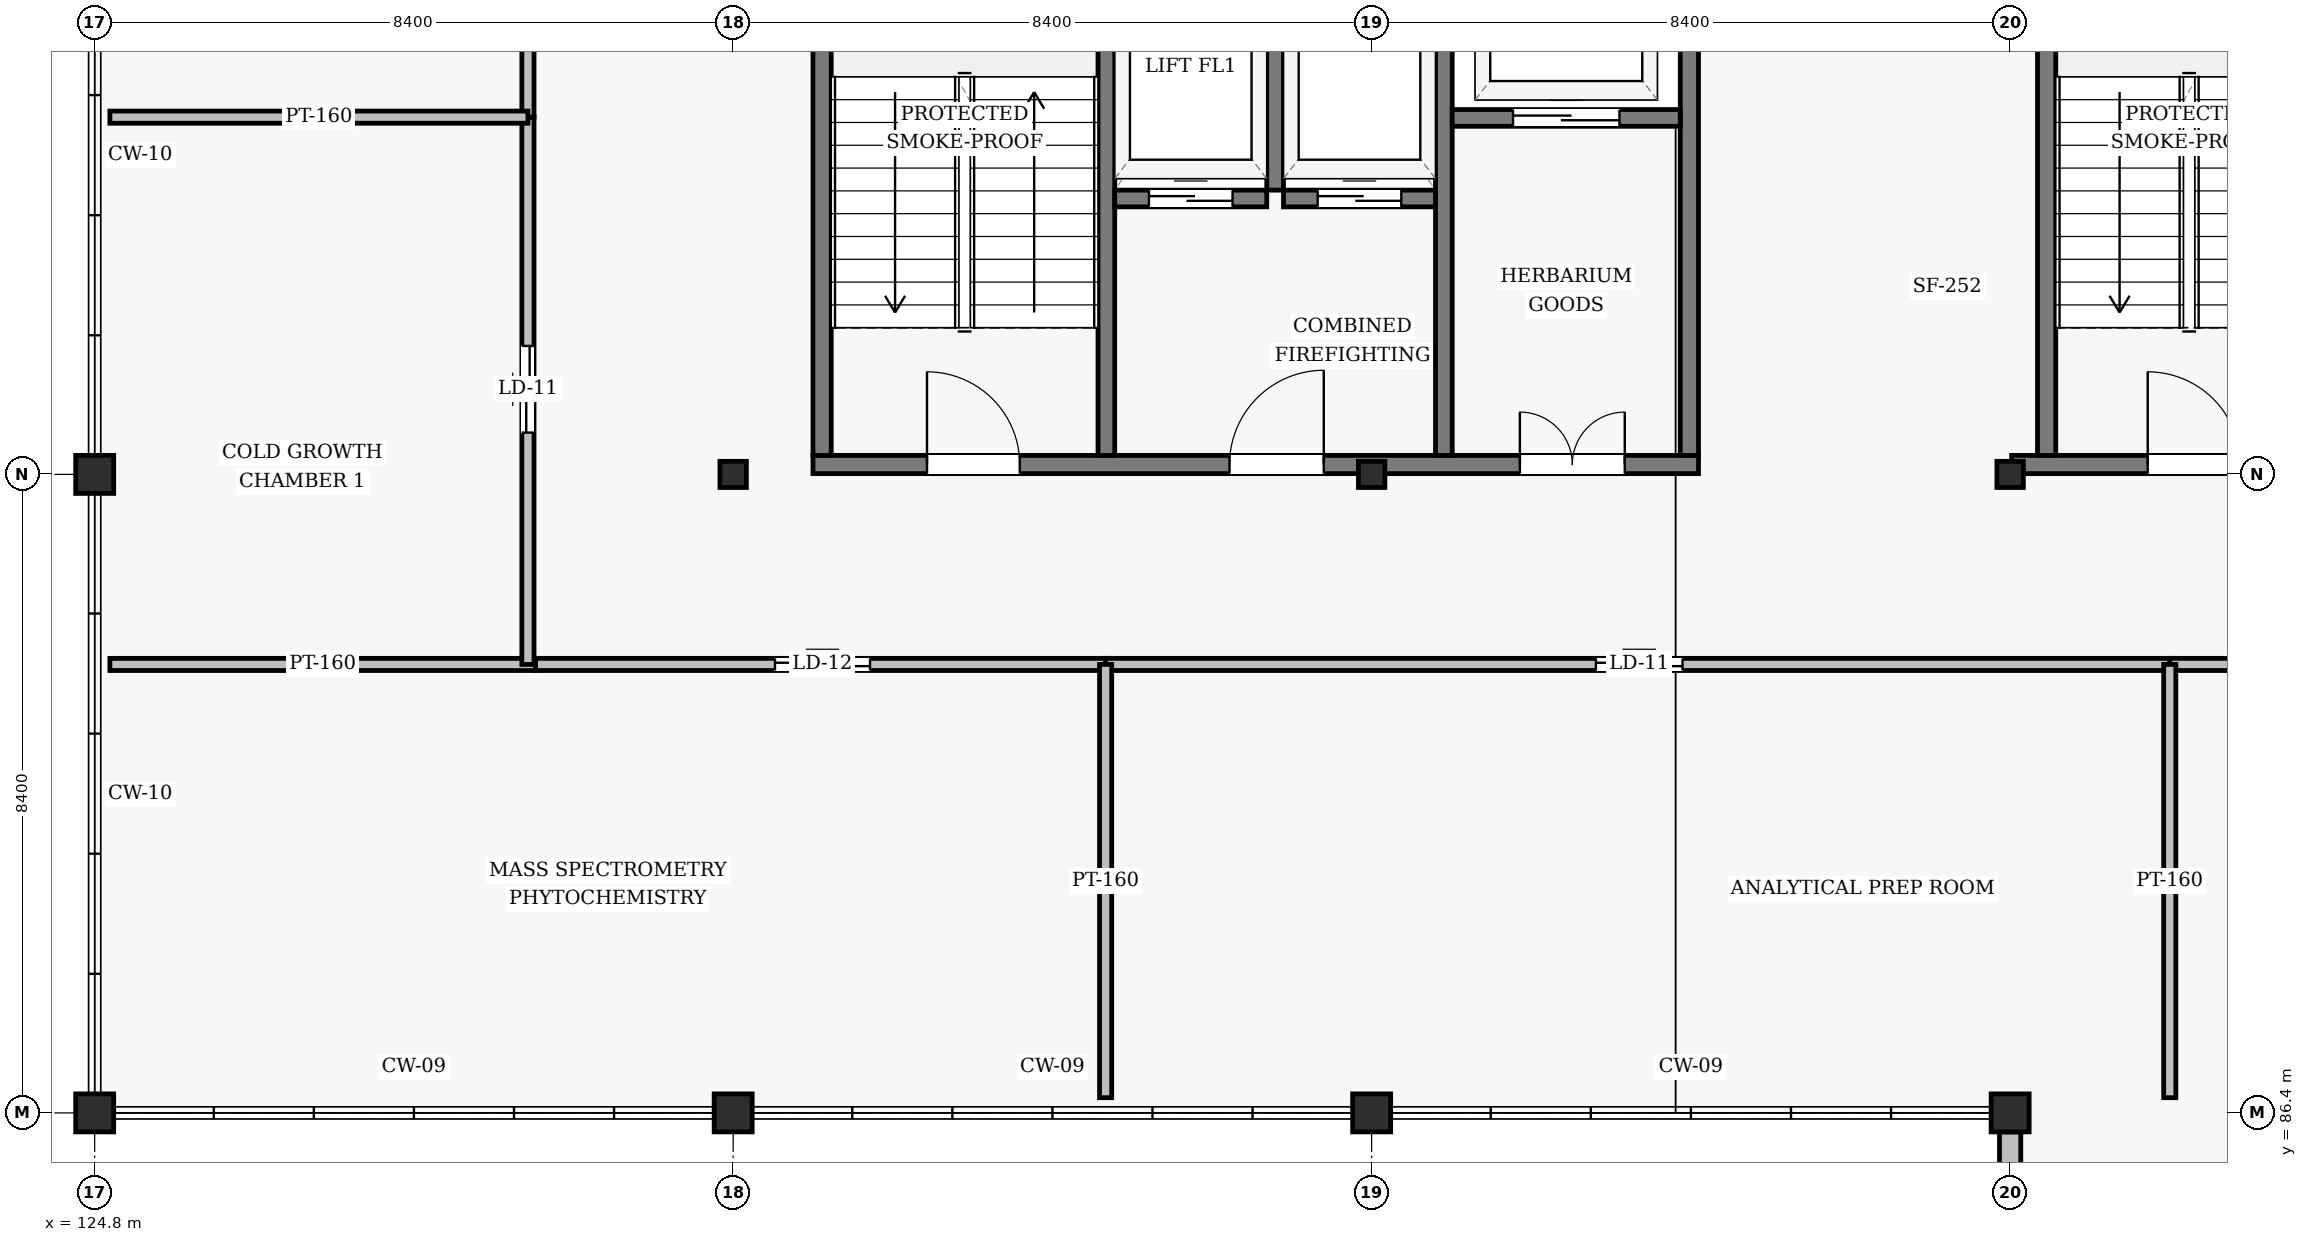
"""IFC4 building model, lengths in metres.
Left out: names, types, materials, properties, quantities, classifications, styles, units other than length and angle.
Written with IfcOpenShell. Run it as: python <this file> out.ifc"""

import sys

from ifc_helpers import new_model, si_unit, direction, frame, frame_2d, origin, origin_2d, place, context, subcontext, project, spatial, rectangle, hollow_rectangle, i_section, extrude, element, fill, save


model = new_model("IFC4")
c1 = context("Model", 3, precision=1e-05, world=origin(), true_north=direction((0.0, 1.0)))
c2 = subcontext(c1, "Body", "Model", "MODEL_VIEW")
j1 = project(units=[si_unit("LENGTHUNIT", "METRE"), si_unit("PLANEANGLEUNIT", "RADIAN")], contexts=[c1])
p1 = place(None, origin())
s1 = spatial("IfcSite", under=j1, at=p1, CompositionType="ELEMENT")
p2 = place(p1, origin())
s2 = spatial("IfcBuilding", under=s1, at=p2, CompositionType="ELEMENT")
p3 = place(p2, frame((0.0, 0.0, 39.6)))
s3 = spatial("IfcBuildingStorey", under=s2, at=p3, CompositionType="ELEMENT", Elevation=39.6)
for number, where, z_axis, x_axis in (
    (1, (124.8, 86.4, 0.0), (0.0, 0.0, 1.0), (1.0, 0.0, 0.0)),
    (2, (124.8, 94.8, 0.0), (0.0, 0.0, 1.0), (1.0, 0.0, 0.0)),
    (3, (133.2, 86.4, 0.0), (0.0, 0.0, 1.0), (1.0, 0.0, 0.0)),
):
    element("IfcColumn", number, at=place(p3, frame(where, z_axis=z_axis, x_axis=x_axis)), inside=s3, PredefinedType="COLUMN", context=c2, shape_type="SweptSolid", body=[
        extrude(hollow_rectangle(XDim=0.5, YDim=0.5, WallThickness=0.02, InnerFilletRadius=0.02, OuterFilletRadius=0.04, at=origin_2d()), origin(), (0.0, 0.0, 1.0), 3.6),
    ])
p4 = place(p3, frame((133.2, 94.8, 0.0), z_axis=(0.0, 0.0, 1.0), x_axis=(1.0, 0.0, 0.0)))
e4 = element("IfcColumn", 4, at=p4, inside=s3, PredefinedType="COLUMN", context=c2, shape_type="SweptSolid", body=[
    extrude(i_section(OverallWidth=0.348, OverallDepth=0.344, WebThickness=0.01, FlangeThickness=0.016, FilletRadius=0.02, at=origin_2d()), origin(), (0.0, 0.0, 1.0), 3.6),
])
p5 = place(p3, frame((141.6, 86.4, 0.0), z_axis=(0.0, 0.0, 1.0), x_axis=(1.0, 0.0, 0.0)))
e5 = element("IfcColumn", 5, at=p5, inside=s3, PredefinedType="COLUMN", context=c2, shape_type="SweptSolid", body=[
    extrude(hollow_rectangle(XDim=0.5, YDim=0.5, WallThickness=0.02, InnerFilletRadius=0.02, OuterFilletRadius=0.04, at=origin_2d()), origin(), (0.0, 0.0, 1.0), 3.6),
])
p6 = place(p3, frame((141.6, 94.8, 0.0), z_axis=(0.0, 0.0, 1.0), x_axis=(1.0, 0.0, 0.0)))
e6 = element("IfcColumn", 6, at=p6, inside=s3, PredefinedType="COLUMN", context=c2, shape_type="SweptSolid", body=[
    extrude(i_section(OverallWidth=0.348, OverallDepth=0.344, WebThickness=0.01, FlangeThickness=0.016, FilletRadius=0.02, at=origin_2d()), origin(), (0.0, 0.0, 1.0), 3.6),
])
p7 = place(p3, frame((150.0, 86.4, 0.0), z_axis=(0.0, 0.0, 1.0), x_axis=(1.0, 0.0, 0.0)))
e7 = element("IfcColumn", 7, at=p7, inside=s3, PredefinedType="COLUMN", context=c2, shape_type="SweptSolid", body=[
    extrude(hollow_rectangle(XDim=0.5, YDim=0.5, WallThickness=0.02, InnerFilletRadius=0.02, OuterFilletRadius=0.04, at=origin_2d()), origin(), (0.0, 0.0, 1.0), 3.6),
])
p8 = place(p3, frame((150.0, 94.8, 0.0), z_axis=(0.0, 0.0, 1.0), x_axis=(1.0, 0.0, 0.0)))
e8 = element("IfcColumn", 8, at=p8, inside=s3, PredefinedType="COLUMN", context=c2, shape_type="SweptSolid", body=[
    extrude(i_section(OverallWidth=0.348, OverallDepth=0.344, WebThickness=0.01, FlangeThickness=0.016, FilletRadius=0.02, at=origin_2d()), origin(), (0.0, 0.0, 1.0), 3.6),
])
p9 = place(p3, frame((150.0, 86.15, 0.0), z_axis=(0.0, 0.0, 1.0), x_axis=(0.0, -1.0, 0.0)))
e9 = element("IfcWall", 9, at=p9, inside=s3, PredefinedType="SOLIDWALL", context=c2, shape_type="SweptSolid", body=[
    extrude(rectangle(XDim=3.825, YDim=0.28, at=frame_2d((1.913, 0.0))), origin(), (0.0, 0.0, 1.0), 2.848),
])
p10 = place(p3, frame((134.25, 94.93, 0.0), z_axis=(0.0, 0.0, 1.0), x_axis=(1.0, 0.0, 0.0)))
e10 = element("IfcWall", 10, at=p10, inside=s3, PredefinedType="SHEAR", context=c2, shape_type="SweptSolid", body=[
    extrude(rectangle(XDim=11.65, YDim=0.24, at=frame_2d((5.825, 0.0))), origin(), (0.0, 0.0, 1.0), 3.342),
])
p11 = place(p10, frame((1.5, 0.0, 0.0)))
e11 = element("IfcOpeningElement", 11, at=p11, cuts=e10, PredefinedType="OPENING", context=c2, shape_type="SweptSolid", body=[
    extrude(rectangle(XDim=1.22, YDim=2.18, at=frame_2d((0.61, 1.09))), frame((0.0, 0.13, 0.0), z_axis=(0.0, -1.0, 0.0), x_axis=(1.0, 0.0, 0.0)), (0.0, 0.0, 1.0), 0.26),
])
p12 = place(p10, frame((5.48, 0.0, 0.0)))
e12 = element("IfcOpeningElement", 12, at=p12, cuts=e10, PredefinedType="OPENING", context=c2, shape_type="SweptSolid", body=[
    extrude(rectangle(XDim=1.24, YDim=2.15, at=frame_2d((0.62, 1.075))), frame((0.0, 0.13, 0.0), z_axis=(0.0, -1.0, 0.0), x_axis=(1.0, 0.0, 0.0)), (0.0, 0.0, 1.0), 0.26),
])
p13 = place(p10, frame((9.3, 0.0, 0.0)))
e13 = element("IfcOpeningElement", 13, at=p13, cuts=e10, PredefinedType="OPENING", context=c2, shape_type="SweptSolid", body=[
    extrude(rectangle(XDim=1.38, YDim=2.15, at=frame_2d((0.69, 1.075))), frame((0.0, 0.13, 0.0), z_axis=(0.0, -1.0, 0.0), x_axis=(1.0, 0.0, 0.0)), (0.0, 0.0, 1.0), 0.26),
])
p14 = place(p3, frame((134.37, 95.05, 0.0), z_axis=(0.0, 0.0, 1.0), x_axis=(0.0, 1.0, 0.0)))
e14 = element("IfcWall", 14, at=p14, inside=s3, PredefinedType="SHEAR", context=c2, shape_type="SweptSolid", body=[
    extrude(rectangle(XDim=7.9, YDim=0.24, at=frame_2d((3.95, 0.0))), origin(), (0.0, 0.0, 1.0), 3.342),
])
p15 = place(p3, frame((138.11, 95.05, 0.0), z_axis=(0.0, 0.0, 1.0), x_axis=(0.0, 1.0, 0.0)))
e15 = element("IfcWall", 15, at=p15, inside=s3, PredefinedType="SHEAR", context=c2, shape_type="SweptSolid", body=[
    extrude(rectangle(XDim=7.9, YDim=0.22, at=frame_2d((3.95, 0.0))), origin(), (0.0, 0.0, 1.0), 3.342),
])
p16 = place(p3, frame((140.33, 98.54, 0.0), z_axis=(0.0, 0.0, 1.0), x_axis=(0.0, 1.0, 0.0)))
e16 = element("IfcWall", 16, at=p16, inside=s3, PredefinedType="SHEAR", context=c2, shape_type="SweptSolid", body=[
    extrude(rectangle(XDim=4.41, YDim=0.22, at=frame_2d((2.205, 0.0))), origin(), (0.0, 0.0, 1.0), 3.342),
])
p17 = place(p3, frame((142.55, 95.05, 0.0), z_axis=(0.0, 0.0, 1.0), x_axis=(0.0, 1.0, 0.0)))
e17 = element("IfcWall", 17, at=p17, inside=s3, PredefinedType="SHEAR", context=c2, shape_type="SweptSolid", body=[
    extrude(rectangle(XDim=7.9, YDim=0.22, at=frame_2d((3.95, 0.0))), origin(), (0.0, 0.0, 1.0), 3.342),
])
p18 = place(p3, frame((145.78, 95.05, 0.0), z_axis=(0.0, 0.0, 1.0), x_axis=(0.0, 1.0, 0.0)))
e18 = element("IfcWall", 18, at=p18, inside=s3, PredefinedType="SHEAR", context=c2, shape_type="SweptSolid", body=[
    extrude(rectangle(XDim=7.9, YDim=0.24, at=frame_2d((3.95, 0.0))), origin(), (0.0, 0.0, 1.0), 3.342),
])
p19 = place(p3, frame((138.22, 98.43, 0.0), z_axis=(0.0, 0.0, 1.0), x_axis=(1.0, 0.0, 0.0)))
e19 = element("IfcWall", 19, at=p19, inside=s3, PredefinedType="SHEAR", context=c2, shape_type="SweptSolid", body=[
    extrude(rectangle(XDim=2.0, YDim=0.22, at=frame_2d((1.0, 0.0))), origin(), (0.0, 0.0, 1.0), 3.342),
])
p20 = place(p19, frame((0.45, 0.0, 0.0)))
e20 = element("IfcOpeningElement", 20, at=p20, cuts=e19, PredefinedType="OPENING", context=c2, shape_type="SweptSolid", body=[
    extrude(rectangle(XDim=1.1, YDim=2.15, at=frame_2d((0.55, 1.075))), frame((0.0, 0.12, 0.0), z_axis=(0.0, -1.0, 0.0), x_axis=(1.0, 0.0, 0.0)), (0.0, 0.0, 1.0), 0.24),
])
p21 = place(p3, frame((140.44, 98.43, 0.0), z_axis=(0.0, 0.0, 1.0), x_axis=(1.0, 0.0, 0.0)))
e21 = element("IfcWall", 21, at=p21, inside=s3, PredefinedType="SHEAR", context=c2, shape_type="SweptSolid", body=[
    extrude(rectangle(XDim=2.0, YDim=0.22, at=frame_2d((1.0, 0.0))), origin(), (0.0, 0.0, 1.0), 3.342),
])
p22 = place(p21, frame((0.45, 0.0, 0.0)))
e22 = element("IfcOpeningElement", 22, at=p22, cuts=e21, PredefinedType="OPENING", context=c2, shape_type="SweptSolid", body=[
    extrude(rectangle(XDim=1.1, YDim=2.15, at=frame_2d((0.55, 1.075))), frame((0.0, 0.12, 0.0), z_axis=(0.0, -1.0, 0.0), x_axis=(1.0, 0.0, 0.0)), (0.0, 0.0, 1.0), 0.24),
])
p23 = place(p3, frame((142.66, 99.49, 0.0), z_axis=(0.0, 0.0, 1.0), x_axis=(1.0, 0.0, 0.0)))
e23 = element("IfcWall", 23, at=p23, inside=s3, PredefinedType="SHEAR", context=c2, shape_type="SweptSolid", body=[
    extrude(rectangle(XDim=3.0, YDim=0.22, at=frame_2d((1.5, 0.0))), origin(), (0.0, 0.0, 1.0), 3.342),
])
p24 = place(p23, frame((0.8, 0.0, 0.0)))
e24 = element("IfcOpeningElement", 24, at=p24, cuts=e23, PredefinedType="OPENING", context=c2, shape_type="SweptSolid", body=[
    extrude(rectangle(XDim=1.4, YDim=2.2, at=frame_2d((0.7, 1.1))), frame((0.0, 0.12, 0.0), z_axis=(0.0, -1.0, 0.0), x_axis=(1.0, 0.0, 0.0)), (0.0, 0.0, 1.0), 0.24),
])
p25 = place(p3, frame((150.02, 94.93, 0.0), z_axis=(0.0, 0.0, 1.0), x_axis=(1.0, 0.0, 0.0)))
e25 = element("IfcWall", 25, at=p25, inside=s3, PredefinedType="SHEAR", context=c2, shape_type="SweptSolid", body=[
    extrude(rectangle(XDim=8.77, YDim=0.24, at=frame_2d((4.385, 0.0))), origin(), (0.0, 0.0, 1.0), 3.342),
])
p26 = place(p25, frame((1.79, 0.0, 0.0)))
e26 = element("IfcOpeningElement", 26, at=p26, cuts=e25, PredefinedType="OPENING", context=c2, shape_type="SweptSolid", body=[
    extrude(rectangle(XDim=1.22, YDim=2.18, at=frame_2d((0.61, 1.09))), frame((0.0, 0.13, 0.0), z_axis=(0.0, -1.0, 0.0), x_axis=(1.0, 0.0, 0.0)), (0.0, 0.0, 1.0), 0.26),
])
p27 = place(p3, frame((150.48, 95.05, 0.0), z_axis=(0.0, 0.0, 1.0), x_axis=(0.0, 1.0, 0.0)))
e27 = element("IfcWall", 27, at=p27, inside=s3, PredefinedType="SHEAR", context=c2, shape_type="SweptSolid", body=[
    extrude(rectangle(XDim=7.9, YDim=0.24, at=frame_2d((3.95, 0.0))), origin(), (0.0, 0.0, 1.0), 3.342),
])
p28 = place(p3, frame((130.6, 92.3, 0.0), z_axis=(0.0, 0.0, 1.0), x_axis=(1.0, 0.0, 0.0)))
e28 = element("IfcWall", 28, at=p28, inside=s3, PredefinedType="PARTITIONING", context=c2, shape_type="SweptSolid", body=[
    extrude(rectangle(XDim=7.5, YDim=0.16, at=frame_2d((3.75, 0.0))), origin(), (0.0, 0.0, 1.0), 2.842),
])
p29 = place(p28, frame((3.15, 0.0, 0.0)))
e29 = element("IfcOpeningElement", 29, at=p29, cuts=e28, PredefinedType="OPENING", context=c2, shape_type="SweptSolid", body=[
    extrude(rectangle(XDim=1.25, YDim=2.12, at=frame_2d((0.625, 1.06))), frame((0.0, 0.09, 0.0), z_axis=(0.0, -1.0, 0.0), x_axis=(1.0, 0.0, 0.0)), (0.0, 0.0, 1.0), 0.18),
])
p30 = place(p3, frame((138.1, 92.3, 0.0), z_axis=(0.0, 0.0, 1.0), x_axis=(1.0, 0.0, 0.0)))
e30 = element("IfcWall", 30, at=p30, inside=s3, PredefinedType="PARTITIONING", context=c2, shape_type="SweptSolid", body=[
    extrude(rectangle(XDim=14.0, YDim=0.16, at=frame_2d((7.0, 0.0))), origin(), (0.0, 0.0, 1.0), 2.842),
])
p31 = place(p30, frame((6.45, 0.0, 0.0)))
e31 = element("IfcOpeningElement", 31, at=p31, cuts=e30, PredefinedType="OPENING", context=c2, shape_type="SweptSolid", body=[
    extrude(rectangle(XDim=1.14, YDim=2.12, at=frame_2d((0.57, 1.06))), frame((0.0, 0.09, 0.0), z_axis=(0.0, -1.0, 0.0), x_axis=(1.0, 0.0, 0.0)), (0.0, 0.0, 1.0), 0.18),
])
p32 = place(p3, frame((152.1, 92.3, 0.0), z_axis=(0.0, 0.0, 1.0), x_axis=(1.0, 0.0, 0.0)))
e32 = element("IfcWall", 32, at=p32, inside=s3, PredefinedType="PARTITIONING", context=c2, shape_type="SweptSolid", body=[
    extrude(rectangle(XDim=9.3, YDim=0.16, at=frame_2d((4.65, 0.0))), origin(), (0.0, 0.0, 1.0), 2.842),
])
p33 = place(p32, frame((4.05, 0.0, 0.0)))
e33 = element("IfcOpeningElement", 33, at=p33, cuts=e32, PredefinedType="OPENING", context=c2, shape_type="SweptSolid", body=[
    extrude(rectangle(XDim=1.25, YDim=2.12, at=frame_2d((0.625, 1.06))), frame((0.0, 0.09, 0.0), z_axis=(0.0, -1.0, 0.0), x_axis=(1.0, 0.0, 0.0)), (0.0, 0.0, 1.0), 0.18),
])
p34 = place(p3, frame((125.0, 92.3, 0.0), z_axis=(0.0, 0.0, 1.0), x_axis=(1.0, 0.0, 0.0)))
e34 = element("IfcWall", 34, at=p34, inside=s3, PredefinedType="PARTITIONING", context=c2, shape_type="SweptSolid", body=[
    extrude(rectangle(XDim=5.6, YDim=0.16, at=frame_2d((2.8, 0.0))), origin(), (0.0, 0.0, 1.0), 3.342),
])
p35 = place(p3, frame((138.1, 86.6, 0.0), z_axis=(0.0, 0.0, 1.0), x_axis=(0.0, 1.0, 0.0)))
e35 = element("IfcWall", 35, at=p35, inside=s3, PredefinedType="PARTITIONING", context=c2, shape_type="SweptSolid", body=[
    extrude(rectangle(XDim=5.7, YDim=0.16, at=frame_2d((2.85, 0.0))), origin(), (0.0, 0.0, 1.0), 2.992),
])
p36 = place(p3, frame((152.1, 86.6, 0.0), z_axis=(0.0, 0.0, 1.0), x_axis=(0.0, 1.0, 0.0)))
e36 = element("IfcWall", 36, at=p36, inside=s3, PredefinedType="PARTITIONING", context=c2, shape_type="SweptSolid", body=[
    extrude(rectangle(XDim=5.7, YDim=0.16, at=frame_2d((2.85, 0.0))), origin(), (0.0, 0.0, 1.0), 2.942),
])
p37 = place(p3, frame((130.5, 92.3, 0.0), z_axis=(0.0, 0.0, 1.0), x_axis=(0.0, 1.0, 0.0)))
e37 = element("IfcWall", 37, at=p37, inside=s3, PredefinedType="PARTITIONING", context=c2, shape_type="SweptSolid", body=[
    extrude(rectangle(XDim=7.2, YDim=0.16, at=frame_2d((3.6, 0.0))), origin(), (0.0, 0.0, 1.0), 2.842),
])
p38 = place(p37, frame((3.05, 0.0, 0.0)))
e38 = element("IfcOpeningElement", 38, at=p38, cuts=e37, PredefinedType="OPENING", context=c2, shape_type="SweptSolid", body=[
    extrude(rectangle(XDim=1.14, YDim=2.12, at=frame_2d((0.57, 1.06))), frame((0.0, 0.09, 0.0), z_axis=(0.0, -1.0, 0.0), x_axis=(1.0, 0.0, 0.0)), (0.0, 0.0, 1.0), 0.18),
])
p39 = place(p3, frame((130.5, 99.5, 0.0), z_axis=(0.0, 0.0, 1.0), x_axis=(0.0, 1.0, 0.0)))
e39 = element("IfcWall", 39, at=p39, inside=s3, PredefinedType="PARTITIONING", context=c2, shape_type="SweptSolid", body=[
    extrude(rectangle(XDim=7.0, YDim=0.16, at=frame_2d((3.5, 0.0))), origin(), (0.0, 0.0, 1.0), 2.842),
])
p40 = place(p39, frame((2.95, 0.0, 0.0)))
e40 = element("IfcOpeningElement", 40, at=p40, cuts=e39, PredefinedType="OPENING", context=c2, shape_type="SweptSolid", body=[
    extrude(rectangle(XDim=1.14, YDim=2.12, at=frame_2d((0.57, 1.06))), frame((0.0, 0.09, 0.0), z_axis=(0.0, -1.0, 0.0), x_axis=(1.0, 0.0, 0.0)), (0.0, 0.0, 1.0), 0.18),
])
p41 = place(p3, frame((125.0, 99.5, 0.0), z_axis=(0.0, 0.0, 1.0), x_axis=(1.0, 0.0, 0.0)))
e41 = element("IfcWall", 41, at=p41, inside=s3, PredefinedType="PARTITIONING", context=c2, shape_type="SweptSolid", body=[
    extrude(rectangle(XDim=5.5, YDim=0.16, at=frame_2d((2.75, 0.0))), origin(), (0.0, 0.0, 1.0), 3.342),
])
p42 = place(p11, origin())
e42 = element("IfcDoor", 42, at=p42, inside=s3, OperationType="SINGLE_SWING_LEFT", PredefinedType="DOOR", context=c2, shape_type="SweptSolid", body=[
    extrude(rectangle(XDim=1.22, YDim=2.18, at=frame_2d((0.61, 1.09))), frame((0.0, 0.025, 0.0), z_axis=(0.0, -1.0, 0.0), x_axis=(1.0, 0.0, 0.0)), (0.0, 0.0, 1.0), 0.05),
])
fill(e11, e42)
p43 = place(p12, frame((1.24, 0.0, 0.0), z_axis=(0.0, 0.0, 1.0), x_axis=(-1.0, 0.0, 0.0)))
e43 = element("IfcDoor", 43, at=p43, inside=s3, OperationType="SINGLE_SWING_RIGHT", PredefinedType="DOOR", context=c2, shape_type="SweptSolid", body=[
    extrude(rectangle(XDim=1.24, YDim=2.15, at=frame_2d((0.62, 1.075))), frame((0.0, 0.025, 0.0), z_axis=(0.0, -1.0, 0.0), x_axis=(1.0, 0.0, 0.0)), (0.0, 0.0, 1.0), 0.05),
])
fill(e12, e43)
p44 = place(p13, frame((1.38, 0.0, 0.0), z_axis=(0.0, 0.0, 1.0), x_axis=(-1.0, 0.0, 0.0)))
e44 = element("IfcDoor", 44, at=p44, inside=s3, OperationType="DOUBLE_DOOR_SINGLE_SWING", PredefinedType="DOOR", context=c2, shape_type="SweptSolid", body=[
    extrude(rectangle(XDim=1.38, YDim=2.15, at=frame_2d((0.69, 1.075))), frame((0.0, 0.025, 0.0), z_axis=(0.0, -1.0, 0.0), x_axis=(1.0, 0.0, 0.0)), (0.0, 0.0, 1.0), 0.05),
])
fill(e13, e44)
p45 = place(p20, origin())
e45 = element("IfcDoor", 45, at=p45, inside=s3, OperationType="SLIDING_TO_LEFT", PredefinedType="DOOR", context=c2, shape_type="SweptSolid", body=[
    extrude(rectangle(XDim=1.1, YDim=2.15, at=frame_2d((0.55, 1.075))), frame((0.0, 0.025, 0.0), z_axis=(0.0, -1.0, 0.0), x_axis=(1.0, 0.0, 0.0)), (0.0, 0.0, 1.0), 0.05),
])
fill(e20, e45)
p46 = place(p22, origin())
e46 = element("IfcDoor", 46, at=p46, inside=s3, OperationType="SLIDING_TO_LEFT", PredefinedType="DOOR", context=c2, shape_type="SweptSolid", body=[
    extrude(rectangle(XDim=1.1, YDim=2.15, at=frame_2d((0.55, 1.075))), frame((0.0, 0.025, 0.0), z_axis=(0.0, -1.0, 0.0), x_axis=(1.0, 0.0, 0.0)), (0.0, 0.0, 1.0), 0.05),
])
fill(e22, e46)
p47 = place(p24, origin())
e47 = element("IfcDoor", 47, at=p47, inside=s3, OperationType="SLIDING_TO_LEFT", PredefinedType="DOOR", context=c2, shape_type="SweptSolid", body=[
    extrude(rectangle(XDim=1.4, YDim=2.2, at=frame_2d((0.7, 1.1))), frame((0.0, 0.025, 0.0), z_axis=(0.0, -1.0, 0.0), x_axis=(1.0, 0.0, 0.0)), (0.0, 0.0, 1.0), 0.05),
])
fill(e24, e47)
p48 = place(p26, origin())
e48 = element("IfcDoor", 48, at=p48, inside=s3, OperationType="SINGLE_SWING_LEFT", PredefinedType="DOOR", context=c2, shape_type="SweptSolid", body=[
    extrude(rectangle(XDim=1.22, YDim=2.18, at=frame_2d((0.61, 1.09))), frame((0.0, 0.025, 0.0), z_axis=(0.0, -1.0, 0.0), x_axis=(1.0, 0.0, 0.0)), (0.0, 0.0, 1.0), 0.05),
])
fill(e26, e48)
p49 = place(p29, origin())
e49 = element("IfcDoor", 49, at=p49, inside=s3, OperationType="SINGLE_SWING_LEFT", PredefinedType="DOOR", context=c2, shape_type="SweptSolid", body=[
    extrude(rectangle(XDim=1.25, YDim=2.12, at=frame_2d((0.625, 1.06))), frame((0.0, 0.025, 0.0), z_axis=(0.0, -1.0, 0.0), x_axis=(1.0, 0.0, 0.0)), (0.0, 0.0, 1.0), 0.05),
])
fill(e29, e49)
p50 = place(p31, origin())
e50 = element("IfcDoor", 50, at=p50, inside=s3, OperationType="SINGLE_SWING_RIGHT", PredefinedType="DOOR", context=c2, shape_type="SweptSolid", body=[
    extrude(rectangle(XDim=1.14, YDim=2.12, at=frame_2d((0.57, 1.06))), frame((0.0, 0.025, 0.0), z_axis=(0.0, -1.0, 0.0), x_axis=(1.0, 0.0, 0.0)), (0.0, 0.0, 1.0), 0.05),
])
fill(e31, e50)
p51 = place(p38, origin())
e51 = element("IfcDoor", 51, at=p51, inside=s3, OperationType="SINGLE_SWING_RIGHT", PredefinedType="DOOR", context=c2, shape_type="SweptSolid", body=[
    extrude(rectangle(XDim=1.14, YDim=2.12, at=frame_2d((0.57, 1.06))), frame((0.0, 0.025, 0.0), z_axis=(0.0, -1.0, 0.0), x_axis=(1.0, 0.0, 0.0)), (0.0, 0.0, 1.0), 0.05),
])
fill(e38, e51)
save(model, sys.argv[1])
